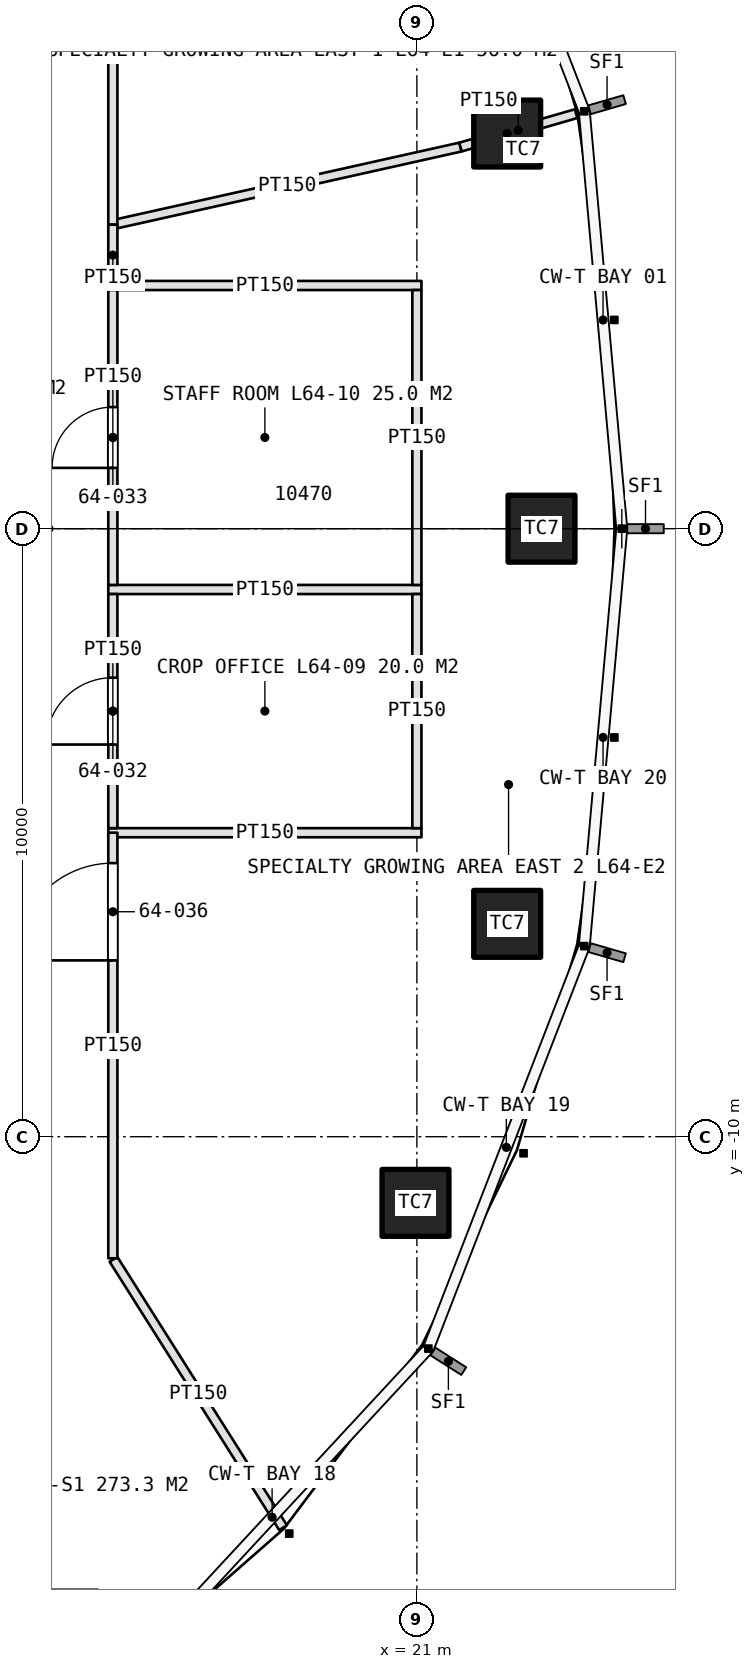
"""IFC4 building model, lengths in metres.
Left out: names, types, materials, properties, quantities, classifications, styles, units other than length and angle.
Written with IfcOpenShell. Run it as: python <this file> out.ifc"""

import sys

from ifc_helpers import new_model, si_unit, direction, frame, frame_2d, origin, origin_2d, place, context, subcontext, project, spatial, rectangle, extrude, element, fill, save


model = new_model("IFC4")
c1 = context("Model", 3, precision=1e-05, world=origin(), true_north=direction((0.0, 1.0)))
c2 = subcontext(c1, "Body", "Model", "MODEL_VIEW")
j1 = project(units=[si_unit("LENGTHUNIT", "METRE"), si_unit("PLANEANGLEUNIT", "RADIAN")], contexts=[c1])
p1 = place(None, origin())
s1 = spatial("IfcSite", under=j1, at=p1, CompositionType="ELEMENT")
p2 = place(p1, origin())
s2 = spatial("IfcBuilding", under=s1, at=p2, CompositionType="ELEMENT")
p3 = place(p2, frame((0.0, 0.0, 288.0)))
s3 = spatial("IfcBuildingStorey", under=s2, at=p3, CompositionType="ELEMENT", Elevation=288.0)
for number, where, z_axis, x_axis in (
    (1, (23.05, 0.0, 0.0), (0.0, 0.0, 1.0), (1.0, 0.0, 0.0)),
    (2, (22.485, 6.499, 0.0), (0.0, 0.0, 1.0), (1.0, 0.0, 0.0)),
    (3, (20.977, -11.088, 0.0), (0.0, 0.0, 1.0), (1.0, 0.0, 0.0)),
    (4, (22.485, -6.499, 0.0), (0.0, 0.0, 1.0), (1.0, 0.0, 0.0)),
):
    element("IfcColumn", number, at=place(p3, frame(where, z_axis=z_axis, x_axis=x_axis)), inside=s3, PredefinedType="COLUMN", context=c2, shape_type="SweptSolid", body=[
        extrude(rectangle(XDim=1.1, YDim=1.1, at=origin_2d()), origin(), (0.0, 0.0, 1.0), 4.2),
    ])
for number, where, z_axis, x_axis in (
    (5, (15.925, -5.0, 0.0), (0.0, 0.0, 1.0), (1.0, 0.0, 0.0)),
    (6, (15.925, -1.0, 0.0), (0.0, 0.0, 1.0), (1.0, 0.0, 0.0)),
    (7, (15.925, 4.0, 0.0), (0.0, 0.0, 1.0), (1.0, 0.0, 0.0)),
):
    element("IfcWall", number, at=place(p3, frame(where, z_axis=z_axis, x_axis=x_axis)), inside=s3, PredefinedType="PARTITIONING", context=c2, shape_type="SweptSolid", body=[
        extrude(rectangle(XDim=5.15, YDim=0.15, at=frame_2d((2.575, 0.0))), origin(), (0.0, 0.0, 1.0), 3.0),
    ])
p4 = place(p3, frame((16.0, -4.925, 0.0), z_axis=(0.0, 0.0, 1.0), x_axis=(0.0, 1.0, 0.0)))
e8 = element("IfcWall", 8, at=p4, inside=s3, PredefinedType="PARTITIONING", context=c2, shape_type="SweptSolid", body=[
    extrude(rectangle(XDim=3.85, YDim=0.15, at=frame_2d((1.925, 0.0))), origin(), (0.0, 0.0, 1.0), 3.0),
])
p5 = place(p4, frame((1.375, 0.0, 0.0)))
e9 = element("IfcOpeningElement", 9, at=p5, cuts=e8, PredefinedType="OPENING", context=c2, shape_type="SweptSolid", body=[
    extrude(rectangle(XDim=1.1, YDim=2.3, at=frame_2d((0.55, 1.15))), frame((0.0, 0.085, 0.0), z_axis=(0.0, -1.0, 0.0), x_axis=(1.0, 0.0, 0.0)), (0.0, 0.0, 1.0), 0.17),
])
p6 = place(p3, frame((21.0, -4.925, 0.0), z_axis=(0.0, 0.0, 1.0), x_axis=(0.0, 1.0, 0.0)))
e10 = element("IfcWall", 10, at=p6, inside=s3, PredefinedType="PARTITIONING", context=c2, shape_type="SweptSolid", body=[
    extrude(rectangle(XDim=3.85, YDim=0.15, at=frame_2d((1.925, 0.0))), origin(), (0.0, 0.0, 1.0), 3.0),
])
p7 = place(p3, frame((16.0, -0.925, 0.0), z_axis=(0.0, 0.0, 1.0), x_axis=(0.0, 1.0, 0.0)))
e11 = element("IfcWall", 11, at=p7, inside=s3, PredefinedType="PARTITIONING", context=c2, shape_type="SweptSolid", body=[
    extrude(rectangle(XDim=4.85, YDim=0.15, at=frame_2d((2.425, 0.0))), origin(), (0.0, 0.0, 1.0), 3.0),
])
p8 = place(p7, frame((1.925, 0.0, 0.0)))
e12 = element("IfcOpeningElement", 12, at=p8, cuts=e11, PredefinedType="OPENING", context=c2, shape_type="SweptSolid", body=[
    extrude(rectangle(XDim=1.0, YDim=2.2, at=frame_2d((0.5, 1.1))), frame((0.0, 0.085, 0.0), z_axis=(0.0, -1.0, 0.0), x_axis=(1.0, 0.0, 0.0)), (0.0, 0.0, 1.0), 0.17),
])
p9 = place(p3, frame((21.0, -0.925, 0.0), z_axis=(0.0, 0.0, 1.0), x_axis=(0.0, 1.0, 0.0)))
e13 = element("IfcWall", 13, at=p9, inside=s3, PredefinedType="PARTITIONING", context=c2, shape_type="SweptSolid", body=[
    extrude(rectangle(XDim=4.85, YDim=0.15, at=frame_2d((2.425, 0.0))), origin(), (0.0, 0.0, 1.0), 3.0),
])
p10 = place(p3, frame((16.011, -12.017, 0.0), z_axis=(0.0, 0.0, 1.0), x_axis=(0.53415837449, -0.845384427916, 0.0)))
e14 = element("IfcWall", 14, at=p10, inside=s3, PredefinedType="PARTITIONING", context=c2, shape_type="SweptSolid", body=[
    extrude(rectangle(XDim=5.22, YDim=0.15, at=frame_2d((2.61, 0.0))), origin(), (0.0, 0.0, 1.0), 3.0),
])
p11 = place(p3, frame((16.02, 5.004, 0.0), z_axis=(0.0, 0.0, 1.0), x_axis=(0.975955215335, 0.217971139513, 0.0)))
e15 = element("IfcWall", 15, at=p11, inside=s3, PredefinedType="PARTITIONING", context=c2, shape_type="SweptSolid", body=[
    extrude(rectangle(XDim=5.837, YDim=0.15, at=frame_2d((2.918, 0.0))), origin(), (0.0, 0.0, 1.0), 3.0),
])
p12 = place(p3, frame((21.716, 6.277, 0.0), z_axis=(0.0, 0.0, 1.0), x_axis=(0.960705414675, 0.277570002366, 0.0)))
e16 = element("IfcWall", 16, at=p12, inside=s3, PredefinedType="PARTITIONING", context=c2, shape_type="SweptSolid", body=[
    extrude(rectangle(XDim=1.98, YDim=0.15, at=frame_2d((0.99, 0.0))), origin(), (0.0, 0.0, 1.0), 3.0),
])
p13 = place(p3, frame((16.0, 5.0, 0.0), z_axis=(0.0, 0.0, 1.0), x_axis=(0.0, 1.0, 0.0)))
e17 = element("IfcWall", 17, at=p13, inside=s3, PredefinedType="PARTITIONING", context=c2, shape_type="SweptSolid", body=[
    extrude(rectangle(XDim=7.0, YDim=0.15, at=frame_2d((3.5, 0.0))), origin(), (0.0, 0.0, 1.0), 3.0),
])
p14 = place(p13, frame((4.15, 0.0, 0.0)))
e18 = element("IfcOpeningElement", 18, at=p14, cuts=e17, PredefinedType="OPENING", context=c2, shape_type="SweptSolid", body=[
    extrude(rectangle(XDim=1.6, YDim=2.4, at=frame_2d((0.8, 1.2))), frame((0.0, 0.085, 0.0), z_axis=(0.0, -1.0, 0.0), x_axis=(1.0, 0.0, 0.0)), (0.0, 0.0, 1.0), 0.17),
])
p15 = place(p3, frame((16.0, -12.0, 0.0), z_axis=(0.0, 0.0, 1.0), x_axis=(0.0, 1.0, 0.0)))
e19 = element("IfcWall", 19, at=p15, inside=s3, PredefinedType="PARTITIONING", context=c2, shape_type="SweptSolid", body=[
    extrude(rectangle(XDim=7.0, YDim=0.15, at=frame_2d((3.5, 0.0))), origin(), (0.0, 0.0, 1.0), 3.0),
])
p16 = place(p15, frame((4.9, 0.0, 0.0)))
e20 = element("IfcOpeningElement", 20, at=p16, cuts=e19, PredefinedType="OPENING", context=c2, shape_type="SweptSolid", body=[
    extrude(rectangle(XDim=1.6, YDim=2.4, at=frame_2d((0.8, 1.2))), frame((0.0, 0.085, 0.0), z_axis=(0.0, -1.0, 0.0), x_axis=(1.0, 0.0, 0.0)), (0.0, 0.0, 1.0), 0.17),
])
p17 = place(p3, frame((16.0, 4.0, 0.0), z_axis=(0.0, 0.0, 1.0), x_axis=(0.0, 1.0, 0.0)))
e21 = element("IfcWall", 21, at=p17, inside=s3, PredefinedType="PARTITIONING", context=c2, shape_type="SweptSolid", body=[
    extrude(rectangle(XDim=1.0, YDim=0.15, at=frame_2d((0.5, 0.0))), origin(), (0.0, 0.0, 1.0), 3.0),
])
p18 = place(p5, origin())
e22 = element("IfcDoor", 22, at=p18, inside=s3, OperationType="SINGLE_SWING_LEFT", PredefinedType="DOOR", context=c2, shape_type="SweptSolid", body=[
    extrude(rectangle(XDim=1.1, YDim=2.3, at=frame_2d((0.55, 1.15))), frame((0.0, 0.025, 0.0), z_axis=(0.0, -1.0, 0.0), x_axis=(1.0, 0.0, 0.0)), (0.0, 0.0, 1.0), 0.05),
])
fill(e9, e22)
p19 = place(p8, origin())
e23 = element("IfcDoor", 23, at=p19, inside=s3, OperationType="SINGLE_SWING_LEFT", PredefinedType="DOOR", context=c2, shape_type="SweptSolid", body=[
    extrude(rectangle(XDim=1.0, YDim=2.2, at=frame_2d((0.5, 1.1))), frame((0.0, 0.025, 0.0), z_axis=(0.0, -1.0, 0.0), x_axis=(1.0, 0.0, 0.0)), (0.0, 0.0, 1.0), 0.05),
])
fill(e12, e23)
p20 = place(p16, origin())
e24 = element("IfcDoor", 24, at=p20, inside=s3, OperationType="DOUBLE_DOOR_SINGLE_SWING", PredefinedType="DOOR", context=c2, shape_type="SweptSolid", body=[
    extrude(rectangle(XDim=1.6, YDim=2.4, at=frame_2d((0.8, 1.2))), frame((0.0, 0.025, 0.0), z_axis=(0.0, -1.0, 0.0), x_axis=(1.0, 0.0, 0.0)), (0.0, 0.0, 1.0), 0.05),
])
fill(e20, e24)
save(model, sys.argv[1])
